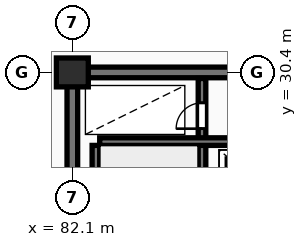
"""IFC4 building model, lengths in metres.
Left out: names, types, materials, properties, quantities, classifications, styles, units other than length and angle.
Written with IfcOpenShell. Run it as: python <this file> out.ifc"""

import sys

from ifc_helpers import new_model, si_unit, direction, frame, frame_2d, origin, origin_2d, place, context, subcontext, project, spatial, rectangle, extrude, element, fill, save


model = new_model("IFC4")
c1 = context("Model", 3, precision=1e-05, world=origin(), true_north=direction((0.0, 1.0)))
c2 = subcontext(c1, "Body", "Model", "MODEL_VIEW")
j1 = project(units=[si_unit("LENGTHUNIT", "METRE"), si_unit("PLANEANGLEUNIT", "RADIAN")], contexts=[c1])
p1 = place(None, origin())
s1 = spatial("IfcSite", under=j1, at=p1, CompositionType="ELEMENT")
p2 = place(p1, origin())
s2 = spatial("IfcBuilding", under=s1, at=p2, CompositionType="ELEMENT")
p3 = place(p2, frame((0.0, 0.0, 19.0)))
s3 = spatial("IfcBuildingStorey", under=s2, at=p3, CompositionType="ELEMENT", Elevation=19.0)
p4 = place(p3, frame((82.1, 30.4, 0.0), z_axis=(0.0, 0.0, 1.0), x_axis=(1.0, 0.0, 0.0)))
e1 = element("IfcColumn", 1, at=p4, inside=s3, PredefinedType="COLUMN", context=c2, shape_type="SweptSolid", body=[
    extrude(rectangle(XDim=1.05, YDim=0.95, at=origin_2d()), origin(), (0.0, 0.0, 1.0), 5.0),
])
p5 = place(p3, frame((81.925, 30.4, 0.0), z_axis=(0.0, 0.0, 1.0), x_axis=(1.0, 0.0, 0.0)))
e2 = element("IfcWall", 2, at=p5, inside=s3, PredefinedType="SHEAR", context=c2, shape_type="SweptSolid", body=[
    extrude(rectangle(XDim=36.265, YDim=0.35, at=frame_2d((18.132, 0.0))), origin(), (0.0, 0.0, 1.0), 5.0),
])
p6 = place(p3, frame((82.1, 18.575, 0.0), z_axis=(0.0, 0.0, 1.0), x_axis=(0.0, 1.0, 0.0)))
e3 = element("IfcWall", 3, at=p6, inside=s3, PredefinedType="SHEAR", context=c2, shape_type="SweptSolid", body=[
    extrude(rectangle(XDim=11.65, YDim=0.35, at=frame_2d((5.825, 0.0))), origin(), (0.0, 0.0, 1.0), 5.0),
])
p7 = place(p3, frame((82.875, 20.4, 0.0), z_axis=(0.0, 0.0, 1.0), x_axis=(0.0, 1.0, 0.0)))
e4 = element("IfcWall", 4, at=p7, inside=s3, PredefinedType="SHEAR", context=c2, shape_type="SweptSolid", body=[
    extrude(rectangle(XDim=7.6, YDim=0.25, at=frame_2d((3.8, 0.0))), origin(), (0.0, 0.0, 1.0), 5.0),
])
p8 = place(p3, frame((86.365, 18.6, 0.0), z_axis=(0.0, 0.0, 1.0), x_axis=(0.0, 1.0, 0.0)))
e5 = element("IfcWall", 5, at=p8, inside=s3, PredefinedType="SHEAR", context=c2, shape_type="SweptSolid", body=[
    extrude(rectangle(XDim=11.6, YDim=0.25, at=frame_2d((5.8, 0.0))), origin(), (0.0, 0.0, 1.0), 5.0),
])
p9 = place(p8, frame((0.45, 0.0, 0.0)))
e6 = element("IfcOpeningElement", 6, at=p9, cuts=e5, PredefinedType="OPENING", context=c2, shape_type="SweptSolid", body=[
    extrude(rectangle(XDim=0.85, YDim=2.05, at=frame_2d((0.425, 1.025))), frame((0.0, 0.135, 0.0), z_axis=(0.0, -1.0, 0.0), x_axis=(1.0, 0.0, 0.0)), (0.0, 0.0, 1.0), 0.27),
])
p10 = place(p8, frame((2.05, 0.0, 0.0)))
e7 = element("IfcOpeningElement", 7, at=p10, cuts=e5, PredefinedType="OPENING", context=c2, shape_type="SweptSolid", body=[
    extrude(rectangle(XDim=1.1, YDim=2.1, at=frame_2d((0.55, 1.05))), frame((0.0, 0.135, 0.0), z_axis=(0.0, -1.0, 0.0), x_axis=(1.0, 0.0, 0.0)), (0.0, 0.0, 1.0), 0.27),
])
p11 = place(p8, frame((9.95, 0.0, 0.0)))
e8 = element("IfcOpeningElement", 8, at=p11, cuts=e5, PredefinedType="OPENING", context=c2, shape_type="SweptSolid", body=[
    extrude(rectangle(XDim=0.85, YDim=2.05, at=frame_2d((0.425, 1.025))), frame((0.0, 0.135, 0.0), z_axis=(0.0, -1.0, 0.0), x_axis=(1.0, 0.0, 0.0)), (0.0, 0.0, 1.0), 0.27),
])
p12 = place(p3, frame((83.0, 28.125, 0.0), z_axis=(0.0, 0.0, 1.0), x_axis=(1.0, 0.0, 0.0)))
e9 = element("IfcWall", 9, at=p12, inside=s3, PredefinedType="SHEAR", context=c2, shape_type="SweptSolid", body=[
    extrude(rectangle(XDim=7.82, YDim=0.25, at=frame_2d((3.91, 0.0))), origin(), (0.0, 0.0, 1.0), 5.0),
])
p13 = place(p11, origin())
e10 = element("IfcDoor", 10, at=p13, inside=s3, OperationType="SINGLE_SWING_LEFT", PredefinedType="DOOR", context=c2, shape_type="SweptSolid", body=[
    extrude(rectangle(XDim=0.85, YDim=2.05, at=frame_2d((0.425, 1.025))), frame((0.0, 0.025, 0.0), z_axis=(0.0, -1.0, 0.0), x_axis=(1.0, 0.0, 0.0)), (0.0, 0.0, 1.0), 0.05),
])
fill(e8, e10)
save(model, sys.argv[1])
